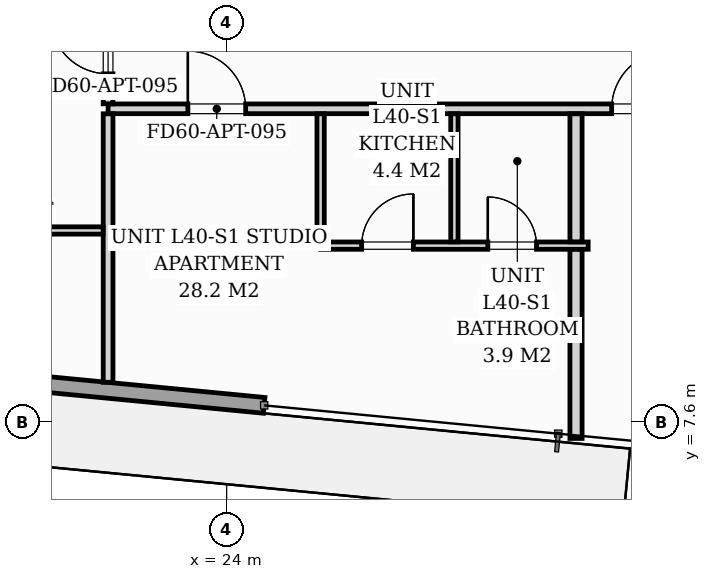
"""IFC4 building model, lengths in metres.
Left out: names, types, materials, properties, quantities, classifications, styles, units other than length and angle.
Written with IfcOpenShell. Run it as: python <this file> out.ifc"""

import sys

from ifc_helpers import new_model, si_unit, direction, frame, frame_2d, origin, place, context, subcontext, project, spatial, rectangle, extrude, source, transform, mapped, element, fill, save


model = new_model("IFC4")
c1 = context("Model", 3, precision=1e-05, world=origin(), true_north=direction((0.0, 1.0)))
c2 = subcontext(c1, "Body", "Model", "MODEL_VIEW")
j1 = project(units=[si_unit("LENGTHUNIT", "METRE"), si_unit("PLANEANGLEUNIT", "RADIAN")], contexts=[c1])
p1 = place(None, origin())
s1 = spatial("IfcSite", under=j1, at=p1, CompositionType="ELEMENT")
p2 = place(p1, origin())
s2 = spatial("IfcBuilding", under=s1, at=p2, CompositionType="ELEMENT")
p3 = place(p2, frame((0.0, 0.0, 140.6)))
s3 = spatial("IfcBuildingStorey", under=s2, at=p3, CompositionType="ELEMENT", Elevation=140.6)
p4 = place(p3, frame((24.617, 7.873, 0.0), z_axis=(0.0, 0.0, 1.0), x_axis=(-0.995395976631, 0.095848055311, 0.0)))
e1 = element("IfcWall", 1, at=p4, inside=s3, PredefinedType="STANDARD", context=c2, shape_type="SweptSolid", body=[
    extrude(rectangle(XDim=17.01, YDim=0.26, at=frame_2d((8.505, 0.0))), origin(), (0.0, 0.0, 1.0), 2.94),
])
p5 = place(p4, frame((7.35, 0.0, 0.0)))
e2 = element("IfcOpeningElement", 2, at=p5, cuts=e1, PredefinedType="OPENING", context=c2, shape_type="SweptSolid", body=[
    extrude(rectangle(XDim=1.8, YDim=2.06, at=frame_2d((0.9, 1.03))), frame((0.0, 0.14, 0.0), z_axis=(0.0, -1.0, 0.0), x_axis=(1.0, 0.0, 0.0)), (0.0, 0.0, 1.0), 0.28),
])
p6 = place(p4, frame((9.7, 0.0, 0.65)))
e3 = element("IfcOpeningElement", 3, at=p6, cuts=e1, PredefinedType="OPENING", context=c2, shape_type="SweptSolid", body=[
    extrude(rectangle(XDim=1.6, YDim=1.5, at=frame_2d((0.8, 0.75))), frame((0.0, 0.14, 0.0), z_axis=(0.0, -1.0, 0.0), x_axis=(1.0, 0.0, 0.0)), (0.0, 0.0, 1.0), 0.28),
])
p7 = place(p3, frame((22.05, 12.75, 0.0), z_axis=(0.0, 0.0, 1.0), x_axis=(1.0, 0.0, 0.0)))
e4 = element("IfcWall", 4, at=p7, inside=s3, PredefinedType="PARTITIONING", context=c2, shape_type="SweptSolid", body=[
    extrude(rectangle(XDim=25.65, YDim=0.16, at=frame_2d((12.825, 0.0))), origin(), (0.0, 0.0, 1.0), 2.94),
])
p8 = place(p7, frame((1.312, 0.0, 0.0)))
e5 = element("IfcOpeningElement", 5, at=p8, cuts=e4, PredefinedType="OPENING", context=c2, shape_type="SweptSolid", body=[
    extrude(rectangle(XDim=0.95, YDim=2.06, at=frame_2d((0.475, 1.03))), frame((0.0, 0.09, 0.0), z_axis=(0.0, -1.0, 0.0), x_axis=(1.0, 0.0, 0.0)), (0.0, 0.0, 1.0), 0.18),
])
p9 = place(p7, frame((8.281, 0.0, 0.0)))
e6 = element("IfcOpeningElement", 6, at=p9, cuts=e4, PredefinedType="OPENING", context=c2, shape_type="SweptSolid", body=[
    extrude(rectangle(XDim=0.95, YDim=2.06, at=frame_2d((0.475, 1.03))), frame((0.0, 0.09, 0.0), z_axis=(0.0, -1.0, 0.0), x_axis=(1.0, 0.0, 0.0)), (0.0, 0.0, 1.0), 0.18),
])
p10 = place(p7, frame((17.268, 0.0, 0.0)))
e7 = element("IfcOpeningElement", 7, at=p10, cuts=e4, PredefinedType="OPENING", context=c2, shape_type="SweptSolid", body=[
    extrude(rectangle(XDim=0.95, YDim=2.06, at=frame_2d((0.475, 1.03))), frame((0.0, 0.09, 0.0), z_axis=(0.0, -1.0, 0.0), x_axis=(1.0, 0.0, 0.0)), (0.0, 0.0, 1.0), 0.18),
])
p11 = place(p3, frame((22.05, 8.253, 0.0), z_axis=(0.0, 0.0, 1.0), x_axis=(0.0, 1.0, 0.0)))
e8 = element("IfcWall", 8, at=p11, inside=s3, PredefinedType="PARTITIONING", context=c2, shape_type="SweptSolid", body=[
    extrude(rectangle(XDim=4.415, YDim=0.16, at=frame_2d((2.208, 0.0))), origin(), (0.0, 0.0, 1.0), 2.94),
])
p12 = place(p3, frame((22.05, 12.832, 0.0), z_axis=(0.0, 0.0, 1.0), x_axis=(0.0, 1.0, 0.0)))
e9 = element("IfcWall", 9, at=p12, inside=s3, PredefinedType="PARTITIONING", context=c2, shape_type="SweptSolid", body=[
    extrude(rectangle(XDim=14.585, YDim=0.16, at=frame_2d((7.292, 0.0))), origin(), (0.0, 0.0, 1.0), 2.94),
])
p13 = place(p12, frame((0.493, 0.0, 0.0)))
e10 = element("IfcOpeningElement", 10, at=p13, cuts=e9, PredefinedType="OPENING", context=c2, shape_type="SweptSolid", body=[
    extrude(rectangle(XDim=0.95, YDim=2.06, at=frame_2d((0.475, 1.03))), frame((0.0, 0.09, 0.0), z_axis=(0.0, -1.0, 0.0), x_axis=(1.0, 0.0, 0.0)), (0.0, 0.0, 1.0), 0.18),
])
p14 = place(p3, frame((25.545, 10.5, 0.0), z_axis=(0.0, 0.0, 1.0), x_axis=(1.0, 0.0, 0.0)))
e11 = element("IfcWall", 11, at=p14, inside=s3, PredefinedType="PARTITIONING", context=c2, shape_type="SweptSolid", body=[
    extrude(rectangle(XDim=4.4, YDim=0.12, at=frame_2d((2.2, 0.0))), origin(), (0.0, 0.0, 1.0), 2.94),
])
p15 = place(p14, frame((0.675, 0.0, 0.0)))
e12 = element("IfcOpeningElement", 12, at=p15, cuts=e11, PredefinedType="OPENING", context=c2, shape_type="SweptSolid", body=[
    extrude(rectangle(XDim=0.85, YDim=2.05, at=frame_2d((0.425, 1.025))), frame((0.0, 0.07, 0.0), z_axis=(0.0, -1.0, 0.0), x_axis=(1.0, 0.0, 0.0)), (0.0, 0.0, 1.0), 0.14),
])
p16 = place(p14, frame((2.75, 0.0, 0.0)))
e13 = element("IfcOpeningElement", 13, at=p16, cuts=e11, PredefinedType="OPENING", context=c2, shape_type="SweptSolid", body=[
    extrude(rectangle(XDim=0.8, YDim=2.02, at=frame_2d((0.4, 1.01))), frame((0.0, 0.07, 0.0), z_axis=(0.0, -1.0, 0.0), x_axis=(1.0, 0.0, 0.0)), (0.0, 0.0, 1.0), 0.14),
])
for number, where, z_axis, x_axis in (
    (14, (25.545, 10.562, 0.0), (0.0, 0.0, 1.0), (0.0, 1.0, 0.0)),
    (15, (27.745, 10.562, 0.0), (0.0, 0.0, 1.0), (0.0, 1.0, 0.0)),
):
    element("IfcWall", number, at=place(p3, frame(where, z_axis=z_axis, x_axis=x_axis)), inside=s3, PredefinedType="PARTITIONING", context=c2, shape_type="SweptSolid", body=[
        extrude(rectangle(XDim=2.106, YDim=0.12, at=frame_2d((1.053, 0.0))), origin(), (0.0, 0.0, 1.0), 2.94),
    ])
p17 = place(p3, frame((29.745, 7.329, 0.0), z_axis=(0.0, 0.0, 1.0), x_axis=(0.0, 1.0, 0.0)))
e16 = element("IfcWall", 16, at=p17, inside=s3, PredefinedType="PARTITIONING", context=c2, shape_type="SweptSolid", body=[
    extrude(rectangle(XDim=3.109, YDim=0.2, at=frame_2d((1.554, 0.0))), origin(), (0.0, 0.0, 1.0), 2.94),
])
p18 = place(p3, frame((29.745, 10.562, 0.0), z_axis=(0.0, 0.0, 1.0), x_axis=(0.0, 1.0, 0.0)))
e17 = element("IfcWall", 17, at=p18, inside=s3, PredefinedType="PARTITIONING", context=c2, shape_type="SweptSolid", body=[
    extrude(rectangle(XDim=2.106, YDim=0.2, at=frame_2d((1.053, 0.0))), origin(), (0.0, 0.0, 1.0), 2.94),
])
p19 = place(p3, frame((8.406, 10.749, 0.0), z_axis=(0.0, 0.0, 1.0), x_axis=(1.0, 0.0, 0.0)))
e18 = element("IfcWall", 18, at=p19, inside=s3, PredefinedType="PARTITIONING", context=c2, shape_type="SweptSolid", body=[
    extrude(rectangle(XDim=13.562, YDim=0.12, at=frame_2d((6.781, 0.0))), origin(), (0.0, 0.0, 1.0), 2.94),
])
p20 = place(p19, frame((7.44, 0.0, 0.0)))
e19 = element("IfcOpeningElement", 19, at=p20, cuts=e18, PredefinedType="OPENING", context=c2, shape_type="SweptSolid", body=[
    extrude(rectangle(XDim=0.85, YDim=2.05, at=frame_2d((0.425, 1.025))), frame((0.0, 0.07, 0.0), z_axis=(0.0, -1.0, 0.0), x_axis=(1.0, 0.0, 0.0)), (0.0, 0.0, 1.0), 0.14),
])
m1 = source(origin(), c2, "Body", "SweptSolid", [
    extrude(rectangle(XDim=0.95, YDim=2.06, at=frame_2d((0.475, 1.03))), frame((0.0, 0.025, 0.0), z_axis=(0.0, -1.0, 0.0), x_axis=(1.0, 0.0, 0.0)), (0.0, 0.0, 1.0), 0.05),
])
p21 = place(p8, origin())
e20 = element("IfcDoor", 20, at=p21, inside=s3, OperationType="SINGLE_SWING_LEFT", PredefinedType="DOOR", context=c2, shape_type="MappedRepresentation", body=[
    mapped(m1, transform((0.0, 0.0, 0.0), scale=1.0)),
])
fill(e5, e20)
m2 = source(origin(), c2, "Body", "SweptSolid", [
    extrude(rectangle(XDim=0.85, YDim=2.05, at=frame_2d((0.425, 1.025))), frame((0.0, 0.025, 0.0), z_axis=(0.0, -1.0, 0.0), x_axis=(1.0, 0.0, 0.0)), (0.0, 0.0, 1.0), 0.05),
])
p22 = place(p15, origin())
e21 = element("IfcDoor", 21, at=p22, inside=s3, OperationType="SINGLE_SWING_RIGHT", PredefinedType="DOOR", context=c2, shape_type="MappedRepresentation", body=[
    mapped(m2, transform((0.0, 0.0, 0.0), scale=1.0)),
])
fill(e12, e21)
m3 = source(origin(), c2, "Body", "SweptSolid", [
    extrude(rectangle(XDim=0.8, YDim=2.02, at=frame_2d((0.4, 1.01))), frame((0.0, 0.025, 0.0), z_axis=(0.0, -1.0, 0.0), x_axis=(1.0, 0.0, 0.0)), (0.0, 0.0, 1.0), 0.05),
])
p23 = place(p16, origin())
e22 = element("IfcDoor", 22, at=p23, inside=s3, OperationType="SINGLE_SWING_LEFT", PredefinedType="DOOR", context=c2, shape_type="MappedRepresentation", body=[
    mapped(m3, transform((0.0, 0.0, 0.0), scale=1.0)),
])
fill(e13, e22)
p24 = place(p9, origin())
e23 = element("IfcDoor", 23, at=p24, inside=s3, OperationType="SINGLE_SWING_RIGHT", PredefinedType="DOOR", context=c2, shape_type="MappedRepresentation", body=[
    mapped(m1, transform((0.0, 0.0, 0.0), scale=1.0)),
])
fill(e6, e23)
p25 = place(p13, origin())
e24 = element("IfcDoor", 24, at=p25, inside=s3, OperationType="SINGLE_SWING_RIGHT", PredefinedType="DOOR", context=c2, shape_type="MappedRepresentation", body=[
    mapped(m1, transform((0.0, 0.0, 0.0), scale=1.0)),
])
fill(e10, e24)
save(model, sys.argv[1])
